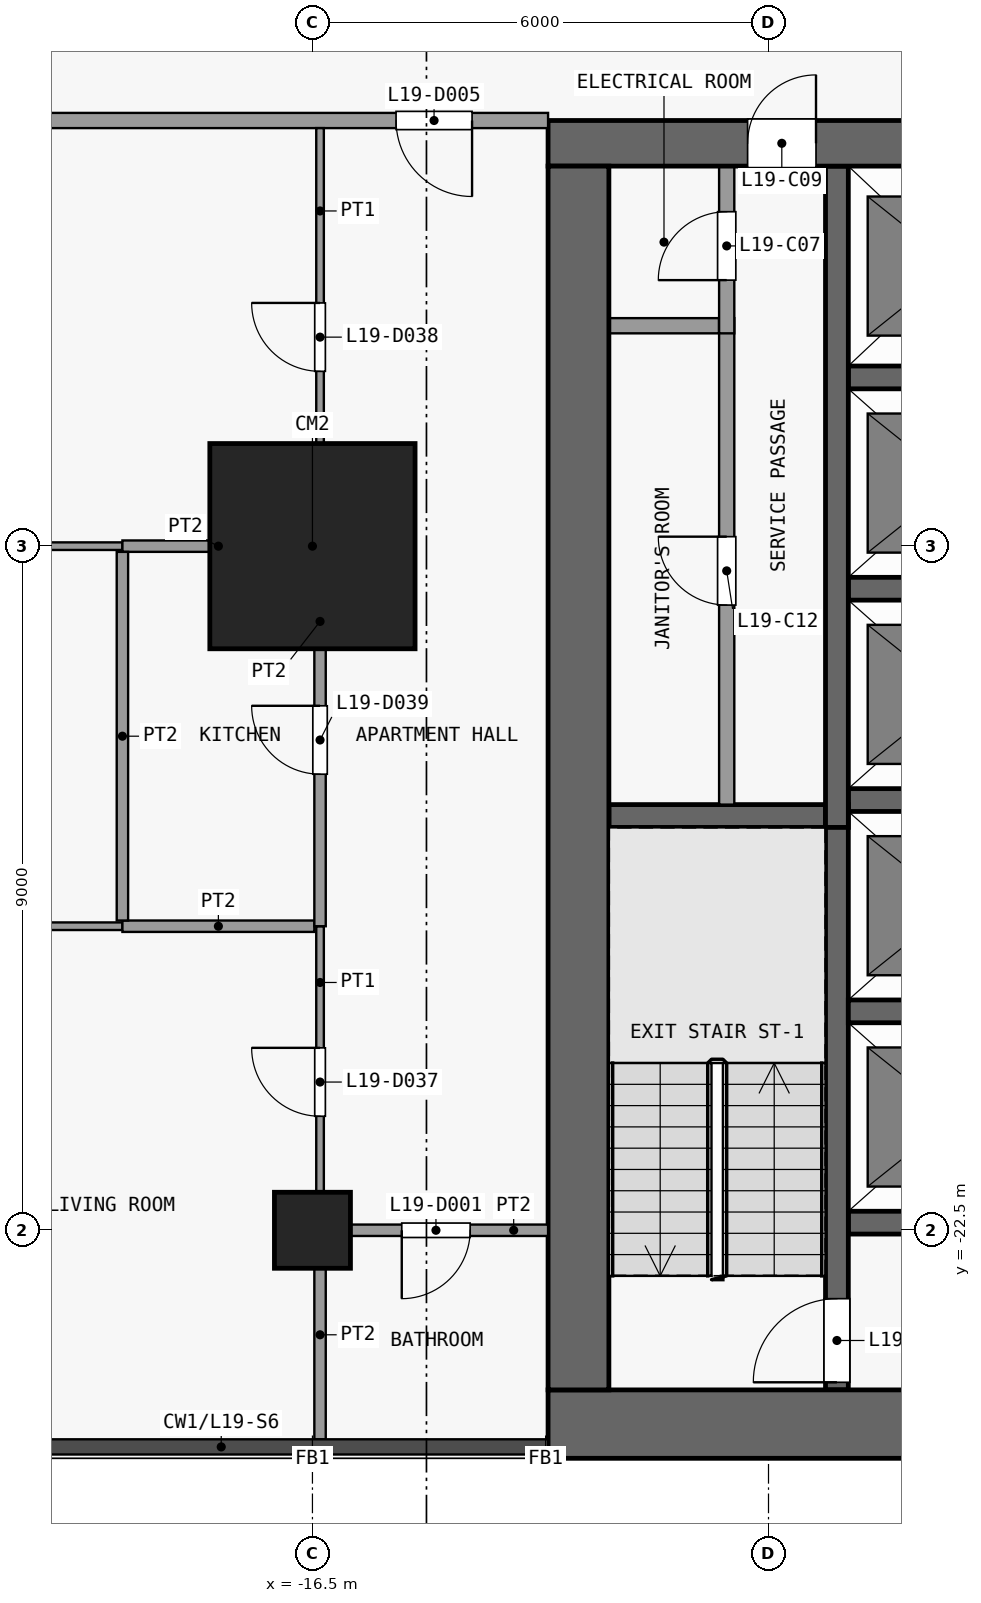
"""IFC4 building model, lengths in metres.
Left out: names, types, materials, properties, quantities, classifications, styles, units other than length and angle.
Written with IfcOpenShell. Run it as: python <this file> out.ifc"""

import sys

from ifc_helpers import new_model, si_unit, direction, frame, frame_2d, origin, origin_2d, place, context, subcontext, project, spatial, rectangle, extrude, element, fill, save


model = new_model("IFC4")
c1 = context("Model", 3, precision=1e-05, world=origin(), true_north=direction((0.0, 1.0)))
c2 = subcontext(c1, "Body", "Model", "MODEL_VIEW")
j1 = project(units=[si_unit("LENGTHUNIT", "METRE"), si_unit("PLANEANGLEUNIT", "RADIAN")], contexts=[c1])
p1 = place(None, origin())
s1 = spatial("IfcSite", under=j1, at=p1, CompositionType="ELEMENT")
p2 = place(p1, origin())
s2 = spatial("IfcBuilding", under=s1, at=p2, CompositionType="ELEMENT")
p3 = place(p2, frame((0.0, 0.0, 81.1)))
s3 = spatial("IfcBuildingStorey", under=s2, at=p3, CompositionType="ELEMENT", Elevation=81.1)
p4 = place(p3, frame((-16.5, -22.5, 0.0), z_axis=(0.0, 0.0, 1.0), x_axis=(1.0, 0.0, 0.0)))
e1 = element("IfcColumn", 1, at=p4, inside=s3, PredefinedType="COLUMN", context=c2, shape_type="SweptSolid", body=[
    extrude(rectangle(XDim=1.0, YDim=1.0, at=origin_2d()), origin(), (0.0, 0.0, 1.0), 3.6),
])
p5 = place(p3, frame((-16.5, -13.5, 0.0), z_axis=(0.0, 0.0, 1.0), x_axis=(1.0, 0.0, 0.0)))
e2 = element("IfcColumn", 2, at=p5, inside=s3, PredefinedType="COLUMN", context=c2, shape_type="SweptSolid", body=[
    extrude(rectangle(XDim=2.7, YDim=2.7, at=origin_2d()), origin(), (0.0, 0.0, 1.0), 3.6),
])
p6 = place(p3, frame((-13.4, -25.05, 0.0), z_axis=(0.0, 0.0, 1.0), x_axis=(1.0, 0.0, 0.0)))
e3 = element("IfcWall", 3, at=p6, inside=s3, PredefinedType="SHEAR", context=c2, shape_type="SweptSolid", body=[
    extrude(rectangle(XDim=26.8, YDim=0.9, at=frame_2d((13.4, 0.0))), origin(), (0.0, 0.0, 1.0), 3.3),
])
p7 = place(p3, frame((-13.4, -8.2, 0.0), z_axis=(0.0, 0.0, 1.0), x_axis=(1.0, 0.0, 0.0)))
e4 = element("IfcWall", 4, at=p7, inside=s3, PredefinedType="SHEAR", context=c2, shape_type="SweptSolid", body=[
    extrude(rectangle(XDim=26.8, YDim=0.6, at=frame_2d((13.4, 0.0))), origin(), (0.0, 0.0, 1.0), 3.3),
])
p8 = place(p7, frame((7.7, 0.0, 0.0)))
e5 = element("IfcOpeningElement", 5, at=p8, cuts=e4, PredefinedType="OPENING", context=c2, shape_type="SweptSolid", body=[
    extrude(rectangle(XDim=1.8, YDim=2.1, at=frame_2d((0.9, 1.05))), frame((0.0, 0.31, 0.0), z_axis=(0.0, -1.0, 0.0), x_axis=(1.0, 0.0, 0.0)), (0.0, 0.0, 1.0), 0.62),
])
p9 = place(p7, frame((17.3, 0.0, 0.0)))
e6 = element("IfcOpeningElement", 6, at=p9, cuts=e4, PredefinedType="OPENING", context=c2, shape_type="SweptSolid", body=[
    extrude(rectangle(XDim=1.8, YDim=2.1, at=frame_2d((0.9, 1.05))), frame((0.0, 0.31, 0.0), z_axis=(0.0, -1.0, 0.0), x_axis=(1.0, 0.0, 0.0)), (0.0, 0.0, 1.0), 0.62),
])
p10 = place(p7, frame((2.625, 0.0, 0.0)))
e7 = element("IfcOpeningElement", 7, at=p10, cuts=e4, PredefinedType="OPENING", context=c2, shape_type="SweptSolid", body=[
    extrude(rectangle(XDim=0.9, YDim=2.1, at=frame_2d((0.45, 1.05))), frame((0.0, 0.31, 0.0), z_axis=(0.0, -1.0, 0.0), x_axis=(1.0, 0.0, 0.0)), (0.0, 0.0, 1.0), 0.62),
])
p11 = place(p7, frame((23.275, 0.0, 0.0)))
e8 = element("IfcOpeningElement", 8, at=p11, cuts=e4, PredefinedType="OPENING", context=c2, shape_type="SweptSolid", body=[
    extrude(rectangle(XDim=0.9, YDim=2.1, at=frame_2d((0.45, 1.05))), frame((0.0, 0.31, 0.0), z_axis=(0.0, -1.0, 0.0), x_axis=(1.0, 0.0, 0.0)), (0.0, 0.0, 1.0), 0.62),
])
p12 = place(p3, frame((-13.0, -24.6, 0.0), z_axis=(0.0, 0.0, 1.0), x_axis=(0.0, 1.0, 0.0)))
e9 = element("IfcWall", 9, at=p12, inside=s3, PredefinedType="SHEAR", context=c2, shape_type="SweptSolid", body=[
    extrude(rectangle(XDim=16.1, YDim=0.8, at=frame_2d((8.05, 0.0))), origin(), (0.0, 0.0, 1.0), 3.3),
])
for number, where, z_axis, x_axis in (
    (10, (-9.45, -22.4, 0.0), (0.0, 0.0, 1.0), (1.0, 0.0, 0.0)),
    (11, (-9.45, -19.62, 0.0), (0.0, 0.0, 1.0), (1.0, 0.0, 0.0)),
):
    element("IfcWall", number, at=place(p3, frame(where, z_axis=z_axis, x_axis=x_axis)), inside=s3, PredefinedType="SHEAR", context=c2, shape_type="SweptSolid", body=[
        extrude(rectangle(XDim=2.8, YDim=0.3, at=frame_2d((1.4, 0.0))), origin(), (0.0, 0.0, 1.0), 3.3),
    ])
p13 = place(p3, frame((-12.6, -17.05, 0.0), z_axis=(0.0, 0.0, 1.0), x_axis=(1.0, 0.0, 0.0)))
e12 = element("IfcWall", 12, at=p13, inside=s3, PredefinedType="SHEAR", context=c2, shape_type="SweptSolid", body=[
    extrude(rectangle(XDim=2.85, YDim=0.3, at=frame_2d((1.425, 0.0))), origin(), (0.0, 0.0, 1.0), 3.3),
])
for number, where, z_axis, x_axis in (
    (13, (-9.45, -16.84, 0.0), (0.0, 0.0, 1.0), (1.0, 0.0, 0.0)),
    (14, (-9.45, -14.06, 0.0), (0.0, 0.0, 1.0), (1.0, 0.0, 0.0)),
    (15, (-9.45, -11.28, 0.0), (0.0, 0.0, 1.0), (1.0, 0.0, 0.0)),
):
    element("IfcWall", number, at=place(p3, frame(where, z_axis=z_axis, x_axis=x_axis)), inside=s3, PredefinedType="SHEAR", context=c2, shape_type="SweptSolid", body=[
        extrude(rectangle(XDim=2.8, YDim=0.3, at=frame_2d((1.4, 0.0))), origin(), (0.0, 0.0, 1.0), 3.3),
    ])
p14 = place(p3, frame((-12.6, -10.6, 0.0), z_axis=(0.0, 0.0, 1.0), x_axis=(1.0, 0.0, 0.0)))
e16 = element("IfcWall", 16, at=p14, inside=s3, PredefinedType="PARTITIONING", context=c2, shape_type="SweptSolid", body=[
    extrude(rectangle(XDim=1.45, YDim=0.2, at=frame_2d((0.725, 0.0))), origin(), (0.0, 0.0, 1.0), 3.3),
])
p15 = place(p3, frame((-11.05, -16.9, 0.0), z_axis=(0.0, 0.0, 1.0), x_axis=(0.0, 1.0, 0.0)))
e17 = element("IfcWall", 17, at=p15, inside=s3, PredefinedType="PARTITIONING", context=c2, shape_type="SweptSolid", body=[
    extrude(rectangle(XDim=6.4, YDim=0.2, at=frame_2d((3.2, 0.0))), origin(), (0.0, 0.0, 1.0), 3.3),
])
p16 = place(p15, frame((2.625, 0.0, 0.0)))
e18 = element("IfcOpeningElement", 18, at=p16, cuts=e17, PredefinedType="OPENING", context=c2, shape_type="SweptSolid", body=[
    extrude(rectangle(XDim=0.9, YDim=2.1, at=frame_2d((0.45, 1.05))), frame((0.0, 0.11, 0.0), z_axis=(0.0, -1.0, 0.0), x_axis=(1.0, 0.0, 0.0)), (0.0, 0.0, 1.0), 0.22),
])
p17 = place(p3, frame((-11.05, -10.7, 0.0), z_axis=(0.0, 0.0, 1.0), x_axis=(0.0, 1.0, 0.0)))
e19 = element("IfcWall", 19, at=p17, inside=s3, PredefinedType="PARTITIONING", context=c2, shape_type="SweptSolid", body=[
    extrude(rectangle(XDim=2.2, YDim=0.2, at=frame_2d((1.1, 0.0))), origin(), (0.0, 0.0, 1.0), 3.3),
])
p18 = place(p17, frame((0.7, 0.0, 0.0)))
e20 = element("IfcOpeningElement", 20, at=p18, cuts=e19, PredefinedType="OPENING", context=c2, shape_type="SweptSolid", body=[
    extrude(rectangle(XDim=0.9, YDim=2.1, at=frame_2d((0.45, 1.05))), frame((0.0, 0.11, 0.0), z_axis=(0.0, -1.0, 0.0), x_axis=(1.0, 0.0, 0.0)), (0.0, 0.0, 1.0), 0.22),
])
p19 = place(p3, frame((-9.6, -24.6, 0.0), z_axis=(0.0, 0.0, 1.0), x_axis=(0.0, 1.0, 0.0)))
e21 = element("IfcWall", 21, at=p19, inside=s3, PredefinedType="SHEAR", context=c2, shape_type="SweptSolid", body=[
    extrude(rectangle(XDim=7.7, YDim=0.3, at=frame_2d((3.85, 0.0))), origin(), (0.0, 0.0, 1.0), 3.3),
])
p20 = place(p19, frame((0.1, 0.0, 0.0)))
e22 = element("IfcOpeningElement", 22, at=p20, cuts=e21, PredefinedType="OPENING", context=c2, shape_type="SweptSolid", body=[
    extrude(rectangle(XDim=1.1, YDim=2.1, at=frame_2d((0.55, 1.05))), frame((0.0, 0.16, 0.0), z_axis=(0.0, -1.0, 0.0), x_axis=(1.0, 0.0, 0.0)), (0.0, 0.0, 1.0), 0.32),
])
p21 = place(p3, frame((-9.6, -17.2, 0.0), z_axis=(0.0, 0.0, 1.0), x_axis=(0.0, 1.0, 0.0)))
e23 = element("IfcWall", 23, at=p21, inside=s3, PredefinedType="SHEAR", context=c2, shape_type="SweptSolid", body=[
    extrude(rectangle(XDim=8.7, YDim=0.3, at=frame_2d((4.35, 0.0))), origin(), (0.0, 0.0, 1.0), 3.3),
])
p22 = place(p3, frame((-16.325, -22.5, 0.0), z_axis=(0.0, 0.0, 1.0), x_axis=(1.0, 0.0, 0.0)))
e24 = element("IfcWall", 24, at=p22, inside=s3, PredefinedType="PARTITIONING", context=c2, shape_type="SweptSolid", body=[
    extrude(rectangle(XDim=2.925, YDim=0.15, at=frame_2d((1.462, 0.0))), origin(), (0.0, 0.0, 1.0), 3.3),
])
p23 = place(p22, frame((1.0, 0.0, 0.0)))
e25 = element("IfcOpeningElement", 25, at=p23, cuts=e24, PredefinedType="OPENING", context=c2, shape_type="SweptSolid", body=[
    extrude(rectangle(XDim=0.9, YDim=2.1, at=frame_2d((0.45, 1.05))), frame((0.0, 0.085, 0.0), z_axis=(0.0, -1.0, 0.0), x_axis=(1.0, 0.0, 0.0)), (0.0, 0.0, 1.0), 0.17),
])
p24 = place(p3, frame((-25.25, -18.5, 0.0), z_axis=(0.0, 0.0, 1.0), x_axis=(1.0, 0.0, 0.0)))
e26 = element("IfcWall", 26, at=p24, inside=s3, PredefinedType="PARTITIONING", context=c2, shape_type="SweptSolid", body=[
    extrude(rectangle(XDim=6.25, YDim=0.1, at=frame_2d((3.125, 0.0))), origin(), (0.0, 0.0, 1.0), 3.3),
])
p25 = place(p24, frame((2.6, 0.0, 0.0)))
e27 = element("IfcOpeningElement", 27, at=p25, cuts=e26, PredefinedType="OPENING", context=c2, shape_type="SweptSolid", body=[
    extrude(rectangle(XDim=0.9, YDim=2.1, at=frame_2d((0.45, 1.05))), frame((0.0, 0.06, 0.0), z_axis=(0.0, -1.0, 0.0), x_axis=(1.0, 0.0, 0.0)), (0.0, 0.0, 1.0), 0.12),
])
p26 = place(p3, frame((-19.0, -18.5, 0.0), z_axis=(0.0, 0.0, 1.0), x_axis=(1.0, 0.0, 0.0)))
e28 = element("IfcWall", 28, at=p26, inside=s3, PredefinedType="PARTITIONING", context=c2, shape_type="SweptSolid", body=[
    extrude(rectangle(XDim=2.525, YDim=0.15, at=frame_2d((1.262, 0.0))), origin(), (0.0, 0.0, 1.0), 3.3),
])
p27 = place(p3, frame((-25.25, -13.5, 0.0), z_axis=(0.0, 0.0, 1.0), x_axis=(1.0, 0.0, 0.0)))
e29 = element("IfcWall", 29, at=p27, inside=s3, PredefinedType="PARTITIONING", context=c2, shape_type="SweptSolid", body=[
    extrude(rectangle(XDim=6.25, YDim=0.1, at=frame_2d((3.125, 0.0))), origin(), (0.0, 0.0, 1.0), 3.3),
])
p28 = place(p3, frame((-19.0, -13.5, 0.0), z_axis=(0.0, 0.0, 1.0), x_axis=(1.0, 0.0, 0.0)))
e30 = element("IfcWall", 30, at=p28, inside=s3, PredefinedType="PARTITIONING", context=c2, shape_type="SweptSolid", body=[
    extrude(rectangle(XDim=2.525, YDim=0.15, at=frame_2d((1.262, 0.0))), origin(), (0.0, 0.0, 1.0), 3.3),
])
p29 = place(p3, frame((-26.15, -7.9, 0.0), z_axis=(0.0, 0.0, 1.0), x_axis=(1.0, 0.0, 0.0)))
e31 = element("IfcWall", 31, at=p29, inside=s3, PredefinedType="PARTITIONING", context=c2, shape_type="SweptSolid", body=[
    extrude(rectangle(XDim=12.75, YDim=0.2, at=frame_2d((6.375, 0.0))), origin(), (0.0, 0.0, 1.0), 3.3),
])
p30 = place(p29, frame((10.75, 0.0, 0.0)))
e32 = element("IfcOpeningElement", 32, at=p30, cuts=e31, PredefinedType="OPENING", context=c2, shape_type="SweptSolid", body=[
    extrude(rectangle(XDim=1.0, YDim=2.1, at=frame_2d((0.5, 1.05))), frame((0.0, 0.11, 0.0), z_axis=(0.0, -1.0, 0.0), x_axis=(1.0, 0.0, 0.0)), (0.0, 0.0, 1.0), 0.22),
])
p31 = place(p3, frame((-19.0, -18.425, 0.0), z_axis=(0.0, 0.0, 1.0), x_axis=(0.0, 1.0, 0.0)))
e33 = element("IfcWall", 33, at=p31, inside=s3, PredefinedType="PARTITIONING", context=c2, shape_type="SweptSolid", body=[
    extrude(rectangle(XDim=4.85, YDim=0.15, at=frame_2d((2.425, 0.0))), origin(), (0.0, 0.0, 1.0), 3.3),
])
p32 = place(p3, frame((-16.4, -22.5, 0.0), z_axis=(0.0, 0.0, 1.0), x_axis=(0.0, 1.0, 0.0)))
e34 = element("IfcWall", 34, at=p32, inside=s3, PredefinedType="PARTITIONING", context=c2, shape_type="SweptSolid", body=[
    extrude(rectangle(XDim=4.0, YDim=0.1, at=frame_2d((2.0, 0.0))), origin(), (0.0, 0.0, 1.0), 3.3),
])
p33 = place(p32, frame((1.5, 0.0, 0.0)))
e35 = element("IfcOpeningElement", 35, at=p33, cuts=e34, PredefinedType="OPENING", context=c2, shape_type="SweptSolid", body=[
    extrude(rectangle(XDim=0.9, YDim=2.1, at=frame_2d((0.45, 1.05))), frame((0.0, 0.06, 0.0), z_axis=(0.0, -1.0, 0.0), x_axis=(1.0, 0.0, 0.0)), (0.0, 0.0, 1.0), 0.12),
])
p34 = place(p3, frame((-16.4, -13.5, 0.0), z_axis=(0.0, 0.0, 1.0), x_axis=(0.0, 1.0, 0.0)))
e36 = element("IfcWall", 36, at=p34, inside=s3, PredefinedType="PARTITIONING", context=c2, shape_type="SweptSolid", body=[
    extrude(rectangle(XDim=5.5, YDim=0.1, at=frame_2d((2.75, 0.0))), origin(), (0.0, 0.0, 1.0), 3.3),
])
p35 = place(p34, frame((2.3, 0.0, 0.0)))
e37 = element("IfcOpeningElement", 37, at=p35, cuts=e36, PredefinedType="OPENING", context=c2, shape_type="SweptSolid", body=[
    extrude(rectangle(XDim=0.9, YDim=2.1, at=frame_2d((0.45, 1.05))), frame((0.0, 0.06, 0.0), z_axis=(0.0, -1.0, 0.0), x_axis=(1.0, 0.0, 0.0)), (0.0, 0.0, 1.0), 0.12),
])
p36 = place(p3, frame((-16.4, -25.25, 0.0), z_axis=(0.0, 0.0, 1.0), x_axis=(0.0, 1.0, 0.0)))
e38 = element("IfcWall", 38, at=p36, inside=s3, PredefinedType="PARTITIONING", context=c2, shape_type="SweptSolid", body=[
    extrude(rectangle(XDim=2.75, YDim=0.15, at=frame_2d((1.375, 0.0))), origin(), (0.0, 0.0, 1.0), 3.3),
])
p37 = place(p3, frame((-16.4, -18.5, 0.0), z_axis=(0.0, 0.0, 1.0), x_axis=(0.0, 1.0, 0.0)))
e39 = element("IfcWall", 39, at=p37, inside=s3, PredefinedType="PARTITIONING", context=c2, shape_type="SweptSolid", body=[
    extrude(rectangle(XDim=5.0, YDim=0.15, at=frame_2d((2.5, 0.0))), origin(), (0.0, 0.0, 1.0), 3.3),
])
p38 = place(p37, frame((2.0, 0.0, 0.0)))
e40 = element("IfcOpeningElement", 40, at=p38, cuts=e39, PredefinedType="OPENING", context=c2, shape_type="SweptSolid", body=[
    extrude(rectangle(XDim=0.9, YDim=2.1, at=frame_2d((0.45, 1.05))), frame((0.0, 0.085, 0.0), z_axis=(0.0, -1.0, 0.0), x_axis=(1.0, 0.0, 0.0)), (0.0, 0.0, 1.0), 0.17),
])
p39 = place(p18, origin())
e41 = element("IfcDoor", 41, at=p39, inside=s3, OperationType="SINGLE_SWING_LEFT", PredefinedType="DOOR", context=c2, shape_type="SweptSolid", body=[
    extrude(rectangle(XDim=0.9, YDim=2.1, at=frame_2d((0.45, 1.05))), frame((0.0, 0.025, 0.0), z_axis=(0.0, -1.0, 0.0), x_axis=(1.0, 0.0, 0.0)), (0.0, 0.0, 1.0), 0.05),
])
fill(e20, e41)
p40 = place(p10, origin())
e42 = element("IfcDoor", 42, at=p40, inside=s3, OperationType="SINGLE_SWING_RIGHT", PredefinedType="DOOR", context=c2, shape_type="SweptSolid", body=[
    extrude(rectangle(XDim=0.9, YDim=2.1, at=frame_2d((0.45, 1.05))), frame((0.0, 0.025, 0.0), z_axis=(0.0, -1.0, 0.0), x_axis=(1.0, 0.0, 0.0)), (0.0, 0.0, 1.0), 0.05),
])
fill(e7, e42)
p41 = place(p16, origin())
e43 = element("IfcDoor", 43, at=p41, inside=s3, OperationType="SINGLE_SWING_RIGHT", PredefinedType="DOOR", context=c2, shape_type="SweptSolid", body=[
    extrude(rectangle(XDim=0.9, YDim=2.1, at=frame_2d((0.45, 1.05))), frame((0.0, 0.025, 0.0), z_axis=(0.0, -1.0, 0.0), x_axis=(1.0, 0.0, 0.0)), (0.0, 0.0, 1.0), 0.05),
])
fill(e18, e43)
p42 = place(p20, origin())
e44 = element("IfcDoor", 44, at=p42, inside=s3, OperationType="SINGLE_SWING_LEFT", PredefinedType="DOOR", context=c2, shape_type="SweptSolid", body=[
    extrude(rectangle(XDim=1.1, YDim=2.1, at=frame_2d((0.55, 1.05))), frame((0.0, 0.025, 0.0), z_axis=(0.0, -1.0, 0.0), x_axis=(1.0, 0.0, 0.0)), (0.0, 0.0, 1.0), 0.05),
])
fill(e22, e44)
p43 = place(p23, origin())
e45 = element("IfcDoor", 45, at=p43, inside=s3, OperationType="SINGLE_SWING_LEFT", PredefinedType="DOOR", context=c2, shape_type="SweptSolid", body=[
    extrude(rectangle(XDim=0.9, YDim=2.1, at=frame_2d((0.45, 1.05))), frame((0.0, 0.025, 0.0), z_axis=(0.0, -1.0, 0.0), x_axis=(1.0, 0.0, 0.0)), (0.0, 0.0, 1.0), 0.05),
])
fill(e25, e45)
p44 = place(p30, origin())
e46 = element("IfcDoor", 46, at=p44, inside=s3, OperationType="SINGLE_SWING_RIGHT", PredefinedType="DOOR", context=c2, shape_type="SweptSolid", body=[
    extrude(rectangle(XDim=1.0, YDim=2.1, at=frame_2d((0.5, 1.05))), frame((0.0, 0.025, 0.0), z_axis=(0.0, -1.0, 0.0), x_axis=(1.0, 0.0, 0.0)), (0.0, 0.0, 1.0), 0.05),
])
fill(e32, e46)
p45 = place(p33, origin())
e47 = element("IfcDoor", 47, at=p45, inside=s3, OperationType="SINGLE_SWING_LEFT", PredefinedType="DOOR", context=c2, shape_type="SweptSolid", body=[
    extrude(rectangle(XDim=0.9, YDim=2.1, at=frame_2d((0.45, 1.05))), frame((0.0, 0.025, 0.0), z_axis=(0.0, -1.0, 0.0), x_axis=(1.0, 0.0, 0.0)), (0.0, 0.0, 1.0), 0.05),
])
fill(e35, e47)
p46 = place(p35, origin())
e48 = element("IfcDoor", 48, at=p46, inside=s3, OperationType="SINGLE_SWING_LEFT", PredefinedType="DOOR", context=c2, shape_type="SweptSolid", body=[
    extrude(rectangle(XDim=0.9, YDim=2.1, at=frame_2d((0.45, 1.05))), frame((0.0, 0.025, 0.0), z_axis=(0.0, -1.0, 0.0), x_axis=(1.0, 0.0, 0.0)), (0.0, 0.0, 1.0), 0.05),
])
fill(e37, e48)
p47 = place(p38, origin())
e49 = element("IfcDoor", 49, at=p47, inside=s3, OperationType="SINGLE_SWING_LEFT", PredefinedType="DOOR", context=c2, shape_type="SweptSolid", body=[
    extrude(rectangle(XDim=0.9, YDim=2.1, at=frame_2d((0.45, 1.05))), frame((0.0, 0.025, 0.0), z_axis=(0.0, -1.0, 0.0), x_axis=(1.0, 0.0, 0.0)), (0.0, 0.0, 1.0), 0.05),
])
fill(e40, e49)
save(model, sys.argv[1])
